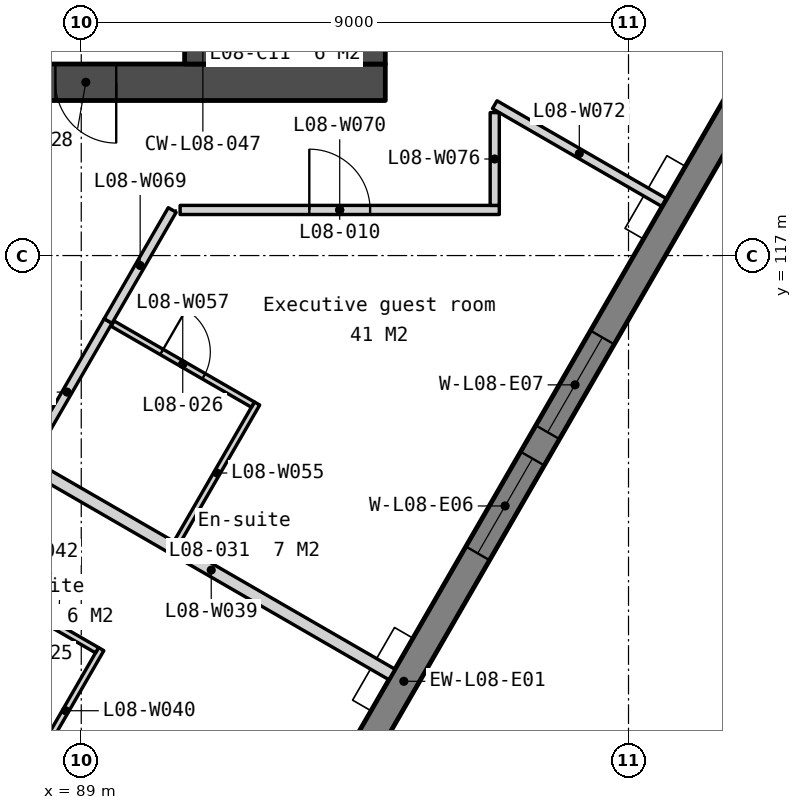
"""IFC4 building model, lengths in metres.
Left out: names, types, materials, properties, quantities, classifications, styles, units other than length and angle.
Written with IfcOpenShell. Run it as: python <this file> out.ifc"""

import sys

from ifc_helpers import new_model, si_unit, direction, frame, frame_2d, origin, place, context, subcontext, project, spatial, polyline, rectangle, outline, extrude, element, fill, save


model = new_model("IFC4")
c1 = context("Model", 3, precision=1e-05, world=origin(), true_north=direction((0.0, 1.0)))
c2 = subcontext(c1, "Body", "Model", "MODEL_VIEW")
j1 = project(units=[si_unit("LENGTHUNIT", "METRE"), si_unit("PLANEANGLEUNIT", "RADIAN")], contexts=[c1])
p1 = place(None, origin())
s1 = spatial("IfcSite", under=j1, at=p1, CompositionType="ELEMENT")
p2 = place(p1, origin())
s2 = spatial("IfcBuilding", under=s1, at=p2, CompositionType="ELEMENT")
p3 = place(p2, frame((0.0, 0.0, 42.0)))
s3 = spatial("IfcBuildingStorey", under=s2, at=p3, CompositionType="ELEMENT", Elevation=42.0)
p4 = place(p3, frame((66.0, 119.85, 0.0), z_axis=(0.0, 0.0, 1.0), x_axis=(1.0, 0.0, 0.0)))
e1 = element("IfcWall", 1, at=p4, inside=s3, PredefinedType="SOLIDWALL", context=c2, shape_type="SweptSolid", body=[
    extrude(rectangle(XDim=28.0, YDim=0.6, at=frame_2d((14.0, 0.0))), origin(), (0.0, 0.0, 1.0), 3.35),
])
p5 = place(p4, frame((6.825, 0.0, 0.0)))
e2 = element("IfcOpeningElement", 2, at=p5, cuts=e1, PredefinedType="OPENING", context=c2, shape_type="SweptSolid", body=[
    extrude(rectangle(XDim=1.8, YDim=2.1, at=frame_2d((0.9, 1.05))), frame((0.0, 0.31, 0.0), z_axis=(0.0, -1.0, 0.0), x_axis=(1.0, 0.0, 0.0)), (0.0, 0.0, 1.0), 0.62),
])
p6 = place(p4, frame((15.85, 0.0, 0.0)))
e3 = element("IfcOpeningElement", 3, at=p6, cuts=e1, PredefinedType="OPENING", context=c2, shape_type="SweptSolid", body=[
    extrude(rectangle(XDim=1.5, YDim=2.1, at=frame_2d((0.75, 1.05))), frame((0.0, 0.31, 0.0), z_axis=(0.0, -1.0, 0.0), x_axis=(1.0, 0.0, 0.0)), (0.0, 0.0, 1.0), 0.62),
])
p7 = place(p4, frame((19.375, 0.0, 0.0)))
e4 = element("IfcOpeningElement", 4, at=p7, cuts=e1, PredefinedType="OPENING", context=c2, shape_type="SweptSolid", body=[
    extrude(rectangle(XDim=1.8, YDim=2.1, at=frame_2d((0.9, 1.05))), frame((0.0, 0.31, 0.0), z_axis=(0.0, -1.0, 0.0), x_axis=(1.0, 0.0, 0.0)), (0.0, 0.0, 1.0), 0.62),
])
p8 = place(p4, frame((4.425, 0.0, 0.0)))
e5 = element("IfcOpeningElement", 5, at=p8, cuts=e1, PredefinedType="OPENING", context=c2, shape_type="SweptSolid", body=[
    extrude(rectangle(XDim=1.0, YDim=2.1, at=frame_2d((0.5, 1.05))), frame((0.0, 0.31, 0.0), z_axis=(0.0, -1.0, 0.0), x_axis=(1.0, 0.0, 0.0)), (0.0, 0.0, 1.0), 0.62),
])
p9 = place(p4, frame((9.783, 0.0, 0.0)))
e6 = element("IfcOpeningElement", 6, at=p9, cuts=e1, PredefinedType="OPENING", context=c2, shape_type="SweptSolid", body=[
    extrude(rectangle(XDim=1.0, YDim=2.1, at=frame_2d((0.5, 1.05))), frame((0.0, 0.31, 0.0), z_axis=(0.0, -1.0, 0.0), x_axis=(1.0, 0.0, 0.0)), (0.0, 0.0, 1.0), 0.62),
])
p10 = place(p4, frame((11.525, 0.0, 0.0)))
e7 = element("IfcOpeningElement", 7, at=p10, cuts=e1, PredefinedType="OPENING", context=c2, shape_type="SweptSolid", body=[
    extrude(rectangle(XDim=1.0, YDim=2.1, at=frame_2d((0.5, 1.05))), frame((0.0, 0.31, 0.0), z_axis=(0.0, -1.0, 0.0), x_axis=(1.0, 0.0, 0.0)), (0.0, 0.0, 1.0), 0.62),
])
p11 = place(p4, frame((13.658, 0.0, 0.0)))
e8 = element("IfcOpeningElement", 8, at=p11, cuts=e1, PredefinedType="OPENING", context=c2, shape_type="SweptSolid", body=[
    extrude(rectangle(XDim=1.0, YDim=2.1, at=frame_2d((0.5, 1.05))), frame((0.0, 0.31, 0.0), z_axis=(0.0, -1.0, 0.0), x_axis=(1.0, 0.0, 0.0)), (0.0, 0.0, 1.0), 0.62),
])
p12 = place(p4, frame((22.575, 0.0, 0.0)))
e9 = element("IfcOpeningElement", 9, at=p12, cuts=e1, PredefinedType="OPENING", context=c2, shape_type="SweptSolid", body=[
    extrude(rectangle(XDim=1.0, YDim=2.1, at=frame_2d((0.5, 1.05))), frame((0.0, 0.31, 0.0), z_axis=(0.0, -1.0, 0.0), x_axis=(1.0, 0.0, 0.0)), (0.0, 0.0, 1.0), 0.62),
])
p13 = place(p3, frame((91.0, 122.25, 0.0), z_axis=(0.0, 0.0, 1.0), x_axis=(0.0, -1.0, 0.0)))
e10 = element("IfcWall", 10, at=p13, inside=s3, PredefinedType="SOLIDWALL", context=c2, shape_type="SweptSolid", body=[
    extrude(rectangle(XDim=2.1, YDim=0.6, at=frame_2d((1.05, 0.0))), origin(), (0.0, 0.0, 1.0), 3.35),
])
p14 = place(p3, frame((93.7, 133.95, 0.0), z_axis=(0.0, 0.0, 1.0), x_axis=(0.0, -1.0, 0.0)))
e11 = element("IfcWall", 11, at=p14, inside=s3, PredefinedType="SOLIDWALL", context=c2, shape_type="SweptSolid", body=[
    extrude(rectangle(XDim=13.8, YDim=0.6, at=frame_2d((6.9, 0.0))), origin(), (0.0, 0.0, 1.0), 3.35),
])
p15 = place(p14, frame((0.6, 0.0, 0.0)))
e12 = element("IfcOpeningElement", 12, at=p15, cuts=e11, PredefinedType="OPENING", context=c2, shape_type="SweptSolid", body=[
    extrude(rectangle(XDim=1.1, YDim=2.1, at=frame_2d((0.55, 1.05))), frame((0.0, 0.31, 0.0), z_axis=(0.0, -1.0, 0.0), x_axis=(1.0, 0.0, 0.0)), (0.0, 0.0, 1.0), 0.62),
])
p16 = place(p14, frame((8.963, 0.0, 0.0)))
e13 = element("IfcOpeningElement", 13, at=p16, cuts=e11, PredefinedType="OPENING", context=c2, shape_type="SweptSolid", body=[
    extrude(rectangle(XDim=1.0, YDim=2.1, at=frame_2d((0.5, 1.05))), frame((0.0, 0.31, 0.0), z_axis=(0.0, -1.0, 0.0), x_axis=(1.0, 0.0, 0.0)), (0.0, 0.0, 1.0), 0.62),
])
p17 = place(p14, frame((11.888, 0.0, 0.0)))
e14 = element("IfcOpeningElement", 14, at=p17, cuts=e11, PredefinedType="OPENING", context=c2, shape_type="SweptSolid", body=[
    extrude(rectangle(XDim=1.0, YDim=2.1, at=frame_2d((0.5, 1.05))), frame((0.0, 0.31, 0.0), z_axis=(0.0, -1.0, 0.0), x_axis=(1.0, 0.0, 0.0)), (0.0, 0.0, 1.0), 0.62),
])
p18 = place(p3, frame((83.105, 90.599, -0.15), z_axis=(0.0, 0.0, 1.0), x_axis=(0.499999201451, 0.866025864826, 0.0)))
e15 = element("IfcWall", 15, at=p18, inside=s3, PredefinedType="SOLIDWALL", context=c2, shape_type="SweptSolid", body=[
    extrude(outline(polyline([(44.8, 0.0), (44.8, 3.5), (0.0, 3.5), (0.0, 0.0), (44.8, 0.0)])), frame((0.0, 0.225, 0.0), z_axis=(0.0, -1.0, 0.0), x_axis=(1.0, 0.0, 0.0)), (0.0, 0.0, 1.0), 0.45),
])
p19 = place(p18, frame((0.786, 0.0, 1.05)))
e16 = element("IfcOpeningElement", 16, at=p19, cuts=e15, PredefinedType="OPENING", context=c2, shape_type="SweptSolid", body=[
    extrude(rectangle(XDim=1.2, YDim=1.5, at=frame_2d((0.6, 0.75))), frame((0.0, 0.235, 0.0), z_axis=(0.0, -1.0, 0.0), x_axis=(1.0, 0.0, 0.0)), (0.0, 0.0, 1.0), 0.47),
])
p20 = place(p18, frame((6.91, 0.0, 1.05)))
e17 = element("IfcOpeningElement", 17, at=p20, cuts=e15, PredefinedType="OPENING", context=c2, shape_type="SweptSolid", body=[
    extrude(rectangle(XDim=1.8, YDim=1.5, at=frame_2d((0.9, 0.75))), frame((0.0, 0.235, 0.0), z_axis=(0.0, -1.0, 0.0), x_axis=(1.0, 0.0, 0.0)), (0.0, 0.0, 1.0), 0.47),
])
p21 = place(p18, frame((9.21, 0.0, 1.05)))
e18 = element("IfcOpeningElement", 18, at=p21, cuts=e15, PredefinedType="OPENING", context=c2, shape_type="SweptSolid", body=[
    extrude(rectangle(XDim=1.8, YDim=1.5, at=frame_2d((0.9, 0.75))), frame((0.0, 0.235, 0.0), z_axis=(0.0, -1.0, 0.0), x_axis=(1.0, 0.0, 0.0)), (0.0, 0.0, 1.0), 0.47),
])
p22 = place(p18, frame((15.87, 0.0, 1.05)))
e19 = element("IfcOpeningElement", 19, at=p22, cuts=e15, PredefinedType="OPENING", context=c2, shape_type="SweptSolid", body=[
    extrude(rectangle(XDim=1.8, YDim=1.5, at=frame_2d((0.9, 0.75))), frame((0.0, 0.235, 0.0), z_axis=(0.0, -1.0, 0.0), x_axis=(1.0, 0.0, 0.0)), (0.0, 0.0, 1.0), 0.47),
])
p23 = place(p18, frame((18.17, 0.0, 1.05)))
e20 = element("IfcOpeningElement", 20, at=p23, cuts=e15, PredefinedType="OPENING", context=c2, shape_type="SweptSolid", body=[
    extrude(rectangle(XDim=1.8, YDim=1.5, at=frame_2d((0.9, 0.75))), frame((0.0, 0.235, 0.0), z_axis=(0.0, -1.0, 0.0), x_axis=(1.0, 0.0, 0.0)), (0.0, 0.0, 1.0), 0.47),
])
p24 = place(p18, frame((24.83, 0.0, 1.05)))
e21 = element("IfcOpeningElement", 21, at=p24, cuts=e15, PredefinedType="OPENING", context=c2, shape_type="SweptSolid", body=[
    extrude(rectangle(XDim=1.8, YDim=1.5, at=frame_2d((0.9, 0.75))), frame((0.0, 0.235, 0.0), z_axis=(0.0, -1.0, 0.0), x_axis=(1.0, 0.0, 0.0)), (0.0, 0.0, 1.0), 0.47),
])
p25 = place(p18, frame((27.13, 0.0, 1.05)))
e22 = element("IfcOpeningElement", 22, at=p25, cuts=e15, PredefinedType="OPENING", context=c2, shape_type="SweptSolid", body=[
    extrude(rectangle(XDim=1.8, YDim=1.5, at=frame_2d((0.9, 0.75))), frame((0.0, 0.235, 0.0), z_axis=(0.0, -1.0, 0.0), x_axis=(1.0, 0.0, 0.0)), (0.0, 0.0, 1.0), 0.47),
])
p26 = place(p18, frame((33.79, 0.0, 1.05)))
e23 = element("IfcOpeningElement", 23, at=p26, cuts=e15, PredefinedType="OPENING", context=c2, shape_type="SweptSolid", body=[
    extrude(rectangle(XDim=1.8, YDim=1.5, at=frame_2d((0.9, 0.75))), frame((0.0, 0.235, 0.0), z_axis=(0.0, -1.0, 0.0), x_axis=(1.0, 0.0, 0.0)), (0.0, 0.0, 1.0), 0.47),
])
p27 = place(p18, frame((36.09, 0.0, 1.05)))
e24 = element("IfcOpeningElement", 24, at=p27, cuts=e15, PredefinedType="OPENING", context=c2, shape_type="SweptSolid", body=[
    extrude(rectangle(XDim=1.8, YDim=1.5, at=frame_2d((0.9, 0.75))), frame((0.0, 0.235, 0.0), z_axis=(0.0, -1.0, 0.0), x_axis=(1.0, 0.0, 0.0)), (0.0, 0.0, 1.0), 0.47),
])
p28 = place(p18, frame((42.814, 0.0, 1.05)))
e25 = element("IfcOpeningElement", 25, at=p28, cuts=e15, PredefinedType="OPENING", context=c2, shape_type="SweptSolid", body=[
    extrude(rectangle(XDim=1.2, YDim=1.5, at=frame_2d((0.6, 0.75))), frame((0.0, 0.235, 0.0), z_axis=(0.0, -1.0, 0.0), x_axis=(1.0, 0.0, 0.0)), (0.0, 0.0, 1.0), 0.47),
])
p29 = place(p3, frame((88.165, 113.543, 0.0), z_axis=(0.0, 0.0, 1.0), x_axis=(0.86603516302, -0.499983096127, 0.0)))
e26 = element("IfcWall", 26, at=p29, inside=s3, PredefinedType="PARTITIONING", context=c2, shape_type="SweptSolid", body=[
    extrude(rectangle(XDim=6.865, YDim=0.2, at=frame_2d((3.433, 0.0))), origin(), (0.0, 0.0, 1.0), 3.35),
])
p30 = place(p3, frame((88.158, 108.501, 0.0), z_axis=(0.0, 0.0, 1.0), x_axis=(0.500032503492, 0.866006637072, 0.0)))
e27 = element("IfcWall", 27, at=p30, inside=s3, PredefinedType="PARTITIONING", context=c2, shape_type="SweptSolid", body=[
    extrude(rectangle(XDim=2.34, YDim=0.1, at=frame_2d((1.17, 0.0))), origin(), (0.0, 0.0, 1.0), 3.35),
])
p31 = place(p3, frame((87.116, 111.746, 0.0), z_axis=(0.0, 0.0, 1.0), x_axis=(0.86604923931, -0.499958713387, 0.0)))
e28 = element("IfcWall", 28, at=p31, inside=s3, PredefinedType="PARTITIONING", context=c2, shape_type="SweptSolid", body=[
    extrude(rectangle(XDim=2.475, YDim=0.1, at=frame_2d((1.237, 0.0))), origin(), (0.0, 0.0, 1.0), 3.35),
])
p32 = place(p31, frame((0.837, 0.0, 0.0)))
e29 = element("IfcOpeningElement", 29, at=p32, cuts=e28, PredefinedType="OPENING", context=c2, shape_type="SweptSolid", body=[
    extrude(rectangle(XDim=0.8, YDim=2.1, at=frame_2d((0.4, 1.05))), frame((0.0, 0.06, 0.0), z_axis=(0.0, -1.0, 0.0), x_axis=(1.0, 0.0, 0.0)), (0.0, 0.0, 1.0), 0.12),
])
p33 = place(p3, frame((88.091, 113.585, 0.0), z_axis=(0.0, 0.0, 1.0), x_axis=(0.50000943426, 0.866019956843, 0.0)))
e30 = element("IfcWall", 30, at=p33, inside=s3, PredefinedType="PARTITIONING", context=c2, shape_type="SweptSolid", body=[
    extrude(rectangle(XDim=2.7, YDim=0.15, at=frame_2d((1.35, 0.0))), origin(), (0.0, 0.0, 1.0), 3.35),
])
p34 = place(p3, frame((90.571, 112.281, 0.0), z_axis=(0.0, 0.0, 1.0), x_axis=(0.500007957085, 0.86602080971, 0.0)))
e31 = element("IfcWall", 31, at=p34, inside=s3, PredefinedType="PARTITIONING", context=c2, shape_type="SweptSolid", body=[
    extrude(rectangle(XDim=2.64, YDim=0.1, at=frame_2d((1.32, 0.0))), origin(), (0.0, 0.0, 1.0), 3.35),
])
p35 = place(p3, frame((89.515, 115.881, 0.0), z_axis=(0.0, 0.0, 1.0), x_axis=(0.86601318911, -0.500021155841, 0.0)))
e32 = element("IfcWall", 32, at=p35, inside=s3, PredefinedType="PARTITIONING", context=c2, shape_type="SweptSolid", body=[
    extrude(rectangle(XDim=2.665, YDim=0.1, at=frame_2d((1.333, 0.0))), origin(), (0.0, 0.0, 1.0), 3.35),
])
p36 = place(p35, frame((0.933, 0.0, 0.0)))
e33 = element("IfcOpeningElement", 33, at=p36, cuts=e32, PredefinedType="OPENING", context=c2, shape_type="SweptSolid", body=[
    extrude(rectangle(XDim=0.8, YDim=2.1, at=frame_2d((0.4, 1.05))), frame((0.0, 0.06, 0.0), z_axis=(0.0, -1.0, 0.0), x_axis=(1.0, 0.0, 0.0)), (0.0, 0.0, 1.0), 0.12),
])
p37 = place(p3, frame((89.441, 115.924, 0.0), z_axis=(0.0, 0.0, 1.0), x_axis=(0.499986337096, 0.866033291922, 0.0)))
e34 = element("IfcWall", 34, at=p37, inside=s3, PredefinedType="PARTITIONING", context=c2, shape_type="SweptSolid", body=[
    extrude(rectangle(XDim=2.109, YDim=0.15, at=frame_2d((1.054, 0.0))), origin(), (0.0, 0.0, 1.0), 3.35),
])
p38 = place(p3, frame((90.626, 117.75, 0.0), z_axis=(0.0, 0.0, 1.0), x_axis=(1.0, 0.0, 0.0)))
e35 = element("IfcWall", 35, at=p38, inside=s3, PredefinedType="PARTITIONING", context=c2, shape_type="SweptSolid", body=[
    extrude(rectangle(XDim=5.249, YDim=0.15, at=frame_2d((2.625, 0.0))), origin(), (0.0, 0.0, 1.0), 3.35),
])
p39 = place(p38, frame((2.125, 0.0, 0.0)))
e36 = element("IfcOpeningElement", 36, at=p39, cuts=e35, PredefinedType="OPENING", context=c2, shape_type="SweptSolid", body=[
    extrude(rectangle(XDim=1.0, YDim=2.1, at=frame_2d((0.5, 1.05))), frame((0.0, 0.085, 0.0), z_axis=(0.0, -1.0, 0.0), x_axis=(1.0, 0.0, 0.0)), (0.0, 0.0, 1.0), 0.17),
])
p40 = place(p3, frame((95.8, 119.481, 0.0), z_axis=(0.0, 0.0, 1.0), x_axis=(0.866017228228, -0.500014160211, 0.0)))
e37 = element("IfcWall", 37, at=p40, inside=s3, PredefinedType="PARTITIONING", context=c2, shape_type="SweptSolid", body=[
    extrude(rectangle(XDim=3.212, YDim=0.15, at=frame_2d((1.606, 0.0))), origin(), (0.0, 0.0, 1.0), 3.35),
])
p41 = place(p3, frame((95.8, 117.825, 0.0), z_axis=(0.0, 0.0, 1.0), x_axis=(0.0, 1.0, 0.0)))
e38 = element("IfcWall", 38, at=p41, inside=s3, PredefinedType="PARTITIONING", context=c2, shape_type="SweptSolid", body=[
    extrude(rectangle(XDim=1.526, YDim=0.15, at=frame_2d((0.763, 0.0))), origin(), (0.0, 0.0, 1.0), 3.35),
])
p42 = place(p12, origin())
e39 = element("IfcDoor", 39, at=p42, inside=s3, OperationType="SINGLE_SWING_RIGHT", PredefinedType="DOOR", context=c2, shape_type="SweptSolid", body=[
    extrude(rectangle(XDim=1.0, YDim=2.1, at=frame_2d((0.5, 1.05))), frame((0.0, 0.025, 0.0), z_axis=(0.0, -1.0, 0.0), x_axis=(1.0, 0.0, 0.0)), (0.0, 0.0, 1.0), 0.05),
])
fill(e9, e39)
p43 = place(p24, origin())
e40 = element("IfcWindow", 40, at=p43, inside=s3, PartitioningType="SINGLE_PANEL", PredefinedType="WINDOW", context=c2, shape_type="SweptSolid", body=[
    extrude(rectangle(XDim=1.8, YDim=1.5, at=frame_2d((0.9, 0.75))), frame((0.0, 0.03, 0.0), z_axis=(0.0, -1.0, 0.0), x_axis=(1.0, 0.0, 0.0)), (0.0, 0.0, 1.0), 0.06),
])
fill(e21, e40)
p44 = place(p25, origin())
e41 = element("IfcWindow", 41, at=p44, inside=s3, PartitioningType="SINGLE_PANEL", PredefinedType="WINDOW", context=c2, shape_type="SweptSolid", body=[
    extrude(rectangle(XDim=1.8, YDim=1.5, at=frame_2d((0.9, 0.75))), frame((0.0, 0.03, 0.0), z_axis=(0.0, -1.0, 0.0), x_axis=(1.0, 0.0, 0.0)), (0.0, 0.0, 1.0), 0.06),
])
fill(e22, e41)
p45 = place(p39, origin())
e42 = element("IfcDoor", 42, at=p45, inside=s3, OperationType="SINGLE_SWING_LEFT", PredefinedType="DOOR", context=c2, shape_type="SweptSolid", body=[
    extrude(rectangle(XDim=1.0, YDim=2.1, at=frame_2d((0.5, 1.05))), frame((0.0, 0.025, 0.0), z_axis=(0.0, -1.0, 0.0), x_axis=(1.0, 0.0, 0.0)), (0.0, 0.0, 1.0), 0.05),
])
fill(e36, e42)
p46 = place(p32, origin())
e43 = element("IfcDoor", 43, at=p46, inside=s3, OperationType="SINGLE_SWING_LEFT", PredefinedType="DOOR", context=c2, shape_type="SweptSolid", body=[
    extrude(rectangle(XDim=0.8, YDim=2.1, at=frame_2d((0.4, 1.05))), frame((0.0, 0.025, 0.0), z_axis=(0.0, -1.0, 0.0), x_axis=(1.0, 0.0, 0.0)), (0.0, 0.0, 1.0), 0.05),
])
fill(e29, e43)
p47 = place(p36, origin())
e44 = element("IfcDoor", 44, at=p47, inside=s3, OperationType="SINGLE_SWING_LEFT", PredefinedType="DOOR", context=c2, shape_type="SweptSolid", body=[
    extrude(rectangle(XDim=0.8, YDim=2.1, at=frame_2d((0.4, 1.05))), frame((0.0, 0.025, 0.0), z_axis=(0.0, -1.0, 0.0), x_axis=(1.0, 0.0, 0.0)), (0.0, 0.0, 1.0), 0.05),
])
fill(e33, e44)
save(model, sys.argv[1])
